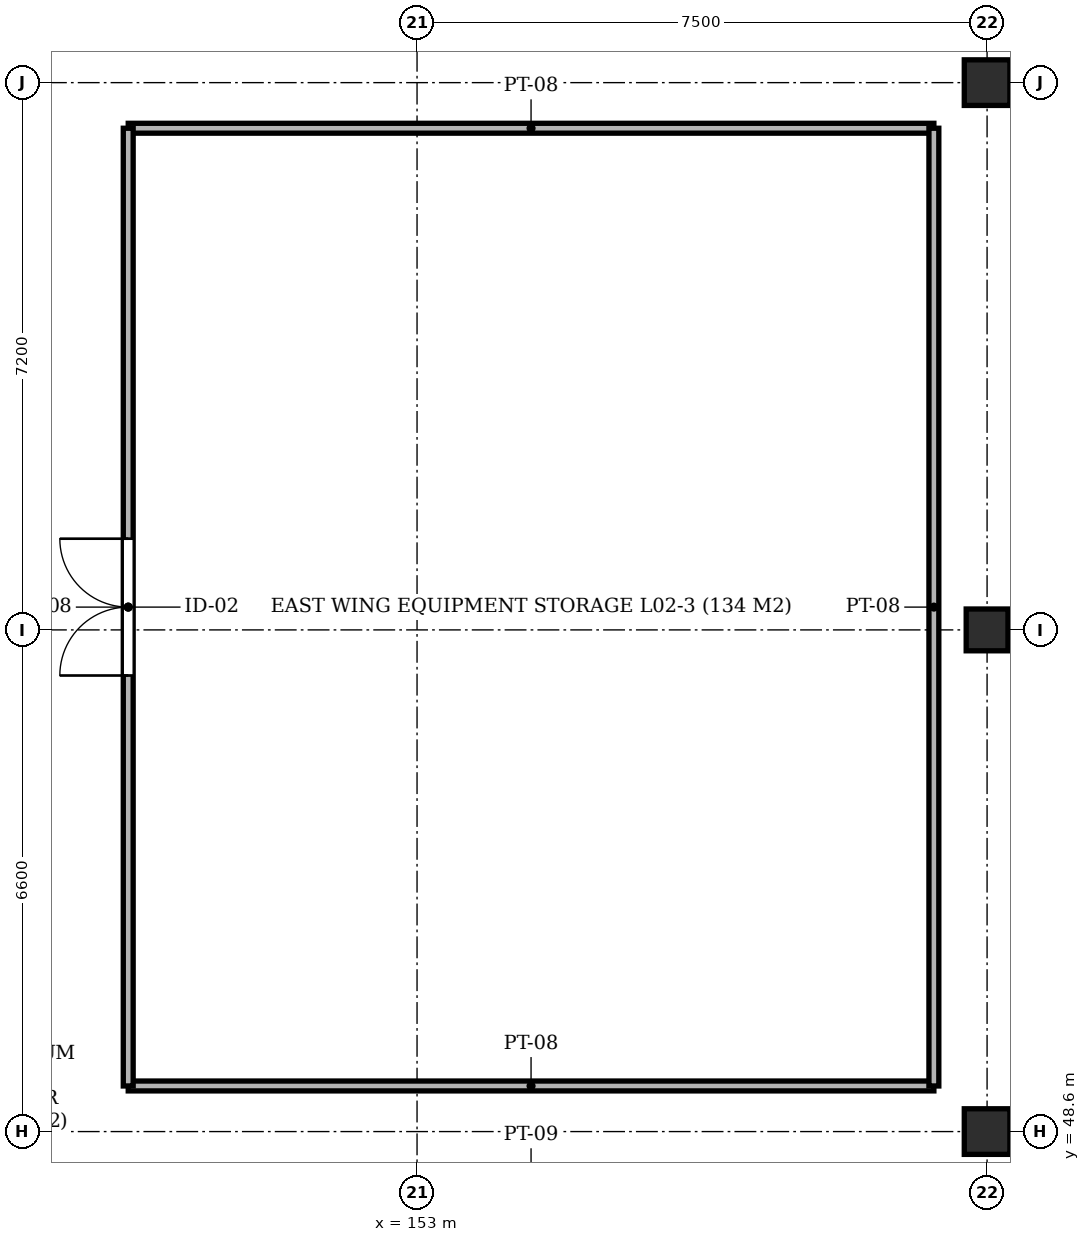
"""IFC4 building model, lengths in metres.
Left out: names, types, materials, properties, quantities, classifications, styles, units other than length and angle.
Written with IfcOpenShell. Run it as: python <this file> out.ifc"""

import sys

from ifc_helpers import new_model, si_unit, direction, frame, frame_2d, origin, origin_2d, place, context, subcontext, project, spatial, rectangle, extrude, element, fill, save


model = new_model("IFC4")
c1 = context("Model", 3, precision=1e-05, world=origin(), true_north=direction((0.0, 1.0)))
c2 = subcontext(c1, "Body", "Model", "MODEL_VIEW")
j1 = project(units=[si_unit("LENGTHUNIT", "METRE"), si_unit("PLANEANGLEUNIT", "RADIAN")], contexts=[c1])
p1 = place(None, origin())
s1 = spatial("IfcSite", under=j1, at=p1, CompositionType="ELEMENT")
p2 = place(p1, origin())
s2 = spatial("IfcBuilding", under=s1, at=p2, CompositionType="ELEMENT")
p3 = place(p2, frame((0.0, 0.0, 9.4)))
s3 = spatial("IfcBuildingStorey", under=s2, at=p3, CompositionType="ELEMENT", Elevation=9.4)
p4 = place(p3, frame((160.5, 48.6, -0.45), z_axis=(0.0, 0.0, 1.0), x_axis=(1.0, 0.0, 0.0)))
e1 = element("IfcColumn", 1, at=p4, inside=s3, PredefinedType="COLUMN", context=c2, shape_type="SweptSolid", body=[
    extrude(rectangle(XDim=0.6, YDim=0.6, at=origin_2d()), origin(), (0.0, 0.0, 1.0), 4.77),
])
p5 = place(p3, frame((160.5, 55.2, -0.45), z_axis=(0.0, 0.0, 1.0), x_axis=(1.0, 0.0, 0.0)))
e2 = element("IfcColumn", 2, at=p5, inside=s3, PredefinedType="COLUMN", context=c2, shape_type="SweptSolid", body=[
    extrude(rectangle(XDim=0.55, YDim=0.55, at=origin_2d()), origin(), (0.0, 0.0, 1.0), 4.77),
])
p6 = place(p3, frame((160.5, 62.4, -0.45), z_axis=(0.0, 0.0, 1.0), x_axis=(1.0, 0.0, 0.0)))
e3 = element("IfcColumn", 3, at=p6, inside=s3, PredefinedType="COLUMN", context=c2, shape_type="SweptSolid", body=[
    extrude(rectangle(XDim=0.6, YDim=0.6, at=origin_2d()), origin(), (0.0, 0.0, 1.0), 4.77),
])
for number, where, z_axis, x_axis in (
    (4, (149.2, 49.2, 0.0), (0.0, 0.0, 1.0), (1.0, 0.0, 0.0)),
    (5, (149.2, 61.8, 0.0), (0.0, 0.0, 1.0), (1.0, 0.0, 0.0)),
):
    element("IfcWall", number, at=place(p3, frame(where, z_axis=z_axis, x_axis=x_axis)), inside=s3, PredefinedType="PARTITIONING", context=c2, shape_type="SweptSolid", body=[
        extrude(rectangle(XDim=10.6, YDim=0.13, at=frame_2d((5.3, 0.0))), origin(), (0.0, 0.0, 1.0), 3.88),
    ])
p7 = place(p3, frame((149.2, 49.2, 0.0), z_axis=(0.0, 0.0, 1.0), x_axis=(0.0, 1.0, 0.0)))
e6 = element("IfcWall", 6, at=p7, inside=s3, PredefinedType="PARTITIONING", context=c2, shape_type="SweptSolid", body=[
    extrude(rectangle(XDim=12.6, YDim=0.13, at=frame_2d((6.3, 0.0))), origin(), (0.0, 0.0, 1.0), 3.88),
])
p8 = place(p7, frame((5.4, 0.0, 0.0)))
e7 = element("IfcOpeningElement", 7, at=p8, cuts=e6, PredefinedType="OPENING", context=c2, shape_type="SweptSolid", body=[
    extrude(rectangle(XDim=1.8, YDim=2.25, at=frame_2d((0.9, 1.125))), frame((0.0, 0.077, 0.0), z_axis=(0.0, -1.0, 0.0), x_axis=(1.0, 0.0, 0.0)), (0.0, 0.0, 1.0), 0.154),
])
p9 = place(p3, frame((159.8, 49.2, 0.0), z_axis=(0.0, 0.0, 1.0), x_axis=(0.0, 1.0, 0.0)))
e8 = element("IfcWall", 8, at=p9, inside=s3, PredefinedType="PARTITIONING", context=c2, shape_type="SweptSolid", body=[
    extrude(rectangle(XDim=12.6, YDim=0.13, at=frame_2d((6.3, 0.0))), origin(), (0.0, 0.0, 1.0), 3.88),
])
p10 = place(p8, origin())
e9 = element("IfcDoor", 9, at=p10, inside=s3, OperationType="DOUBLE_DOOR_SINGLE_SWING", PredefinedType="DOOR", context=c2, shape_type="SweptSolid", body=[
    extrude(rectangle(XDim=1.8, YDim=2.25, at=frame_2d((0.9, 1.125))), frame((0.0, 0.025, 0.0), z_axis=(0.0, -1.0, 0.0), x_axis=(1.0, 0.0, 0.0)), (0.0, 0.0, 1.0), 0.05),
])
fill(e7, e9)
save(model, sys.argv[1])
